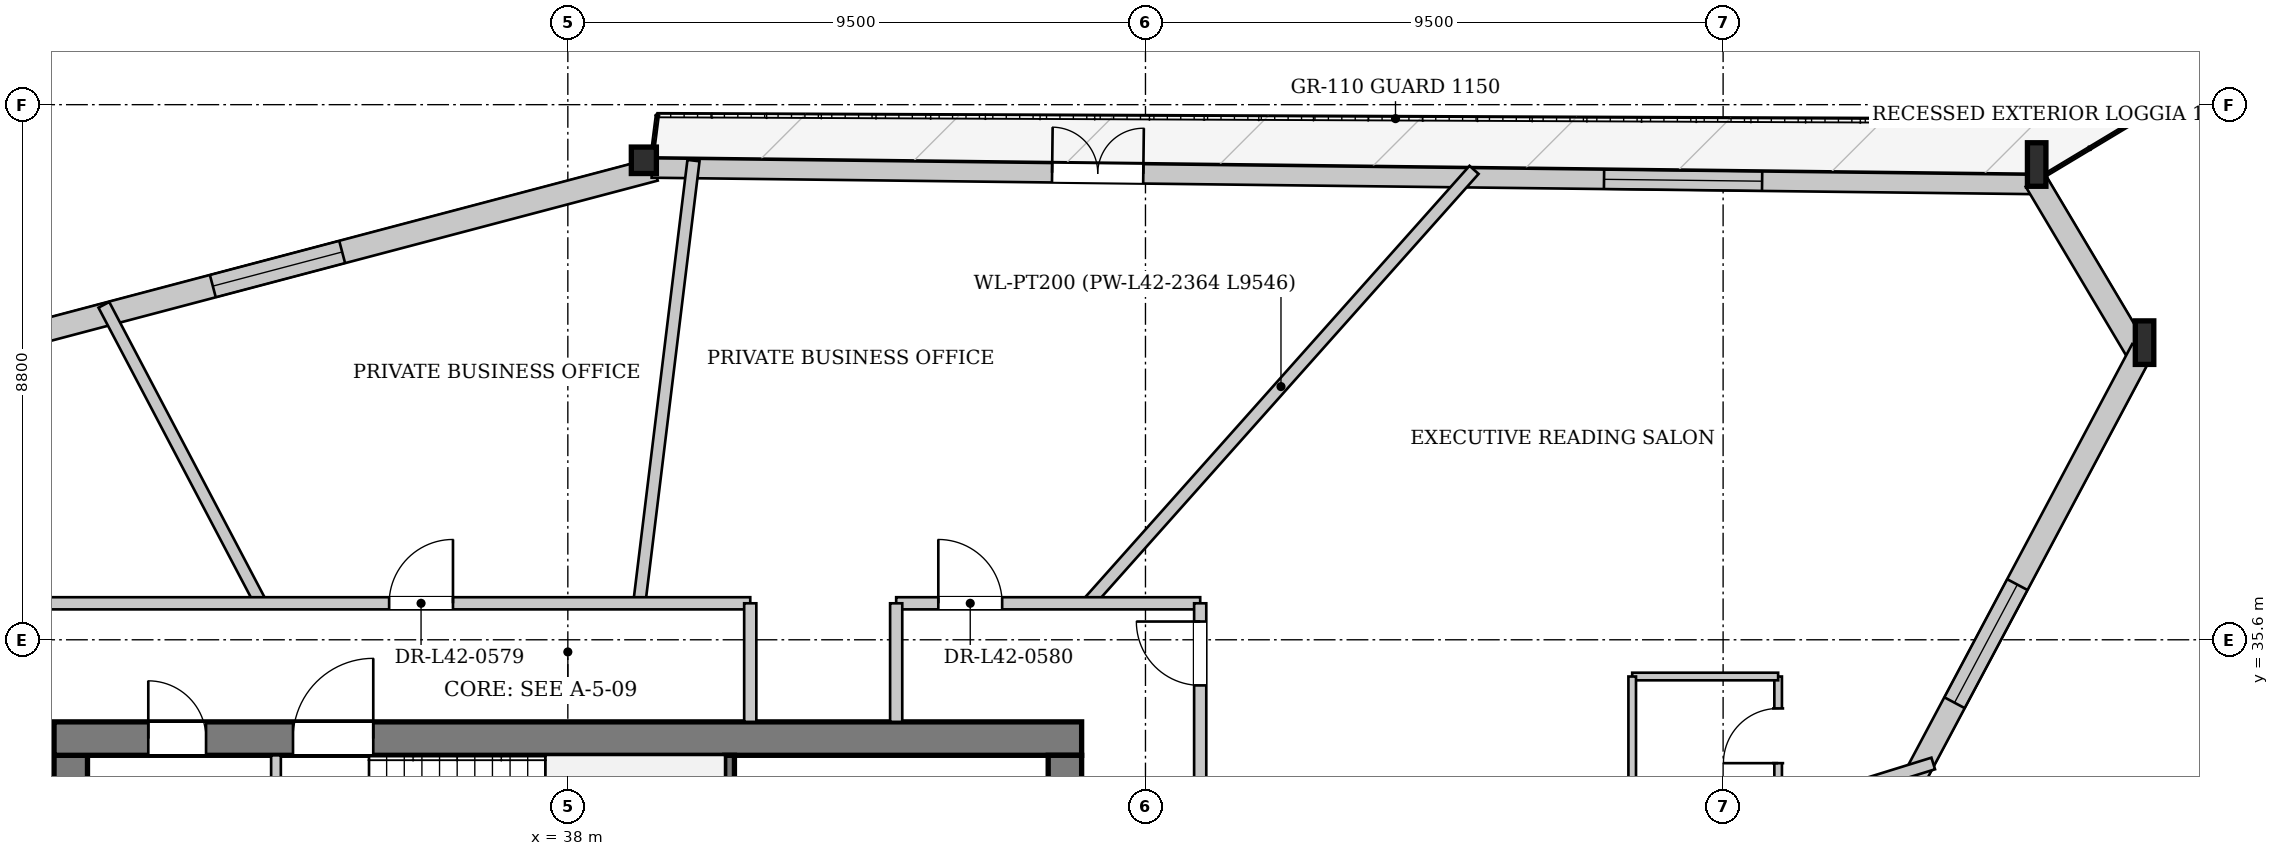
"""IFC4 building model, lengths in metres.
Left out: names, types, materials, properties, quantities, classifications, styles, units other than length and angle.
Written with IfcOpenShell. Run it as: python <this file> out.ifc"""

import sys

from ifc_helpers import new_model, si_unit, direction, frame, frame_2d, origin, origin_2d, place, context, subcontext, project, spatial, rectangle, i_section, extrude, source, transform, mapped, element, fill, save


model = new_model("IFC4")
c1 = context("Model", 3, precision=1e-05, world=origin(), true_north=direction((0.0, 1.0)))
c2 = subcontext(c1, "Body", "Model", "MODEL_VIEW")
j1 = project(units=[si_unit("LENGTHUNIT", "METRE"), si_unit("PLANEANGLEUNIT", "RADIAN")], contexts=[c1])
p1 = place(None, origin())
s1 = spatial("IfcSite", under=j1, at=p1, CompositionType="ELEMENT")
p2 = place(p1, origin())
s2 = spatial("IfcBuilding", under=s1, at=p2, CompositionType="ELEMENT")
p3 = place(p2, frame((0.0, 0.0, 160.8)))
s3 = spatial("IfcBuildingStorey", under=s2, at=p3, CompositionType="ELEMENT", Elevation=160.8)
m1 = source(origin(), c2, "Body", "SweptSolid", [
    extrude(i_section(OverallWidth=0.304, OverallDepth=0.716, WebThickness=0.021, FlangeThickness=0.04, at=origin_2d()), origin(), (0.0, 0.0, 1.0), 3.419),
])
p4 = place(p3, frame((64.064, 40.286, 0.0), z_axis=(-0.077692176517, 0.11710953078, 0.990075392841), x_axis=(-0.833298909309, -0.552822691054, 0.0)))
e1 = element("IfcColumn", 1, at=p4, inside=s3, PredefinedType="COLUMN", context=c2, shape_type="MappedRepresentation", body=[
    mapped(m1, transform((0.0, 0.0, 0.0), x_axis=(1.0, 0.0, 0.0), y_axis=(0.0, 1.0, 0.0), z_axis=(0.0, 0.0, 1.0), scale=1.0)),
])
m2 = source(origin(), c2, "Body", "SweptSolid", [
    extrude(i_section(OverallWidth=0.304, OverallDepth=0.716, WebThickness=0.021, FlangeThickness=0.04, at=origin_2d()), origin(), (0.0, 0.0, 1.0), 3.415),
])
p5 = place(p3, frame((62.303, 43.246, 0.0), z_axis=(-0.085515107199, 0.099457787721, 0.99136033555), x_axis=(-0.758255258479, -0.651957792337, 0.0)))
e2 = element("IfcColumn", 2, at=p5, inside=s3, PredefinedType="COLUMN", context=c2, shape_type="MappedRepresentation", body=[
    mapped(m2, transform((0.0, 0.0, 0.0), x_axis=(1.0, 0.0, 0.0), y_axis=(0.0, 1.0, 0.0), z_axis=(0.0, 0.0, 1.0), scale=1.0)),
])
m3 = source(origin(), c2, "Body", "SweptSolid", [
    extrude(i_section(OverallWidth=0.412, OverallDepth=0.435, WebThickness=0.031, FlangeThickness=0.05, at=origin_2d()), origin(), (0.0, 0.0, 1.0), 3.396),
])
p6 = place(p3, frame((39.382, 43.519, 0.0), z_axis=(-0.077429287371, -0.019698815914, 0.996803221358), x_axis=(0.246556357223, -0.969128455218, 0.0)))
e3 = element("IfcColumn", 3, at=p6, inside=s3, PredefinedType="COLUMN", context=c2, shape_type="MappedRepresentation", body=[
    mapped(m3, transform((0.0, 0.0, 0.0), x_axis=(1.0, 0.0, 0.0), y_axis=(0.0, 1.0, 0.0), z_axis=(0.0, 0.0, 1.0), scale=1.0)),
])
p7 = place(p3, frame((17.267, 37.484, 0.0), z_axis=(0.0, 0.0, 1.0), x_axis=(0.966875026681, 0.255250235613, 0.0)))
e4 = element("IfcWall", 4, at=p7, inside=s3, PredefinedType="SOLIDWALL", context=c2, shape_type="SweptSolid", body=[
    extrude(rectangle(XDim=22.923, YDim=0.38, at=frame_2d((11.461, 0.0))), origin(), (0.0, 0.0, 1.0), 2.722),
])
p8 = place(p7, frame((5.318, 0.0, 0.352)))
e5 = element("IfcOpeningElement", 5, at=p8, cuts=e4, PredefinedType="OPENING", context=c2, shape_type="SweptSolid", body=[
    extrude(rectangle(XDim=2.2, YDim=2.25, at=frame_2d((1.1, 1.125))), frame((0.0, 0.2, 0.0), z_axis=(0.0, -1.0, 0.0), x_axis=(1.0, 0.0, 0.0)), (0.0, 0.0, 1.0), 0.4),
])
p9 = place(p7, frame((15.405, 0.0, 0.352)))
e6 = element("IfcOpeningElement", 6, at=p9, cuts=e4, PredefinedType="OPENING", context=c2, shape_type="SweptSolid", body=[
    extrude(rectangle(XDim=2.2, YDim=2.25, at=frame_2d((1.1, 1.125))), frame((0.0, 0.2, 0.0), z_axis=(0.0, -1.0, 0.0), x_axis=(1.0, 0.0, 0.0)), (0.0, 0.0, 1.0), 0.4),
])
p10 = place(p3, frame((39.38, 43.359, 0.0), z_axis=(0.0, 0.0, 1.0), x_axis=(0.999929231853, -0.011896692251, 0.0)))
e7 = element("IfcWall", 7, at=p10, inside=s3, PredefinedType="SOLIDWALL", context=c2, shape_type="SweptSolid", body=[
    extrude(rectangle(XDim=22.923, YDim=0.32, at=frame_2d((11.461, 0.0))), origin(), (0.0, 0.0, 1.0), 2.722),
])
p11 = place(p10, frame((6.585, 0.0, 0.0)))
e8 = element("IfcOpeningElement", 8, at=p11, cuts=e7, PredefinedType="OPENING", context=c2, shape_type="SweptSolid", body=[
    extrude(rectangle(XDim=1.5, YDim=2.3, at=frame_2d((0.75, 1.15))), frame((0.0, 0.17, 0.0), z_axis=(0.0, -1.0, 0.0), x_axis=(1.0, 0.0, 0.0)), (0.0, 0.0, 1.0), 0.34),
])
p12 = place(p10, frame((15.663, 0.0, 0.252)))
e9 = element("IfcOpeningElement", 9, at=p12, cuts=e7, PredefinedType="OPENING", context=c2, shape_type="SweptSolid", body=[
    extrude(rectangle(XDim=2.6, YDim=2.35, at=frame_2d((1.3, 1.175))), frame((0.0, 0.17, 0.0), z_axis=(0.0, -1.0, 0.0), x_axis=(1.0, 0.0, 0.0)), (0.0, 0.0, 1.0), 0.34),
])
p13 = place(p3, frame((62.14, 43.149, 0.0), z_axis=(0.0, 0.0, 1.0), x_axis=(0.511323081813, -0.859388565205, 0.0)))
e10 = element("IfcWall", 10, at=p13, inside=s3, PredefinedType="SOLIDWALL", context=c2, shape_type="SweptSolid", body=[
    extrude(rectangle(XDim=3.444, YDim=0.38, at=frame_2d((1.722, 0.0))), origin(), (0.0, 0.0, 1.0), 2.722),
])
p14 = place(p3, frame((63.896, 40.375, 0.0), z_axis=(0.0, 0.0, 1.0), x_axis=(-0.469579724412, -0.882890073804, 0.0)))
e11 = element("IfcWall", 11, at=p14, inside=s3, PredefinedType="SOLIDWALL", context=c2, shape_type="SweptSolid", body=[
    extrude(rectangle(XDim=23.503, YDim=0.38, at=frame_2d((11.751, 0.0))), origin(), (0.0, 0.0, 1.0), 2.722),
])
p15 = place(p14, frame((4.381, 0.0, 0.352)))
e12 = element("IfcOpeningElement", 12, at=p15, cuts=e11, PredefinedType="OPENING", context=c2, shape_type="SweptSolid", body=[
    extrude(rectangle(XDim=2.2, YDim=2.25, at=frame_2d((1.1, 1.125))), frame((0.0, 0.2, 0.0), z_axis=(0.0, -1.0, 0.0), x_axis=(1.0, 0.0, 0.0)), (0.0, 0.0, 1.0), 0.4),
])
p16 = place(p14, frame((15.822, 0.0, 0.352)))
e13 = element("IfcOpeningElement", 13, at=p16, cuts=e11, PredefinedType="OPENING", context=c2, shape_type="SweptSolid", body=[
    extrude(rectangle(XDim=2.2, YDim=2.25, at=frame_2d((1.1, 1.125))), frame((0.0, 0.2, 0.0), z_axis=(0.0, -1.0, 0.0), x_axis=(1.0, 0.0, 0.0)), (0.0, 0.0, 1.0), 0.4),
])
p17 = place(p3, frame((29.825, 19.5, 0.0), z_axis=(0.0, 0.0, 1.0), x_axis=(0.0, 1.0, 0.0)))
e14 = element("IfcWall", 14, at=p17, inside=s3, PredefinedType="SHEAR", context=c2, shape_type="SweptSolid", body=[
    extrude(rectangle(XDim=14.2, YDim=0.55, at=frame_2d((7.1, 0.0))), origin(), (0.0, 0.0, 1.0), 3.33),
])
p18 = place(p17, frame((7.42, 0.0, 0.0)))
e15 = element("IfcOpeningElement", 15, at=p18, cuts=e14, PredefinedType="OPENING", context=c2, shape_type="SweptSolid", body=[
    extrude(rectangle(XDim=1.6, YDim=2.2, at=frame_2d((0.8, 1.1))), frame((0.0, 0.285, 0.0), z_axis=(0.0, -1.0, 0.0), x_axis=(1.0, 0.0, 0.0)), (0.0, 0.0, 1.0), 0.57),
])
p19 = place(p3, frame((29.55, 33.975, 0.0), z_axis=(0.0, 0.0, 1.0), x_axis=(1.0, 0.0, 0.0)))
e16 = element("IfcWall", 16, at=p19, inside=s3, PredefinedType="SHEAR", context=c2, shape_type="SweptSolid", body=[
    extrude(rectangle(XDim=16.9, YDim=0.55, at=frame_2d((8.45, 0.0))), origin(), (0.0, 0.0, 1.0), 3.33),
])
p20 = place(p19, frame((1.55, 0.0, 0.0)))
e17 = element("IfcOpeningElement", 17, at=p20, cuts=e16, PredefinedType="OPENING", context=c2, shape_type="SweptSolid", body=[
    extrude(rectangle(XDim=0.95, YDim=2.1, at=frame_2d((0.475, 1.05))), frame((0.0, 0.285, 0.0), z_axis=(0.0, -1.0, 0.0), x_axis=(1.0, 0.0, 0.0)), (0.0, 0.0, 1.0), 0.57),
])
p21 = place(p19, frame((3.93, 0.0, 0.0)))
e18 = element("IfcOpeningElement", 18, at=p21, cuts=e16, PredefinedType="OPENING", context=c2, shape_type="SweptSolid", body=[
    extrude(rectangle(XDim=1.32, YDim=2.2, at=frame_2d((0.66, 1.1))), frame((0.0, 0.285, 0.0), z_axis=(0.0, -1.0, 0.0), x_axis=(1.0, 0.0, 0.0)), (0.0, 0.0, 1.0), 0.57),
])
p22 = place(p3, frame((46.175, 33.7, 0.0), z_axis=(0.0, 0.0, 1.0), x_axis=(0.0, -1.0, 0.0)))
e19 = element("IfcWall", 19, at=p22, inside=s3, PredefinedType="SHEAR", context=c2, shape_type="SweptSolid", body=[
    extrude(rectangle(XDim=14.2, YDim=0.55, at=frame_2d((7.1, 0.0))), origin(), (0.0, 0.0, 1.0), 3.33),
])
p23 = place(p22, frame((5.18, 0.0, 0.0)))
e20 = element("IfcOpeningElement", 20, at=p23, cuts=e19, PredefinedType="OPENING", context=c2, shape_type="SweptSolid", body=[
    extrude(rectangle(XDim=1.6, YDim=2.2, at=frame_2d((0.8, 1.1))), frame((0.0, 0.285, 0.0), z_axis=(0.0, -1.0, 0.0), x_axis=(1.0, 0.0, 0.0)), (0.0, 0.0, 1.0), 0.57),
])
p24 = place(p22, frame((2.05, 0.0, 0.0)))
e21 = element("IfcOpeningElement", 21, at=p24, cuts=e19, PredefinedType="OPENING", context=c2, shape_type="SweptSolid", body=[
    extrude(rectangle(XDim=0.95, YDim=2.1, at=frame_2d((0.475, 1.05))), frame((0.0, 0.285, 0.0), z_axis=(0.0, -1.0, 0.0), x_axis=(1.0, 0.0, 0.0)), (0.0, 0.0, 1.0), 0.57),
])
p25 = place(p3, frame((40.66, 30.6, 0.0), z_axis=(0.0, 0.0, 1.0), x_axis=(0.0, 1.0, 0.0)))
e22 = element("IfcWall", 22, at=p25, inside=s3, PredefinedType="PARTITIONING", context=c2, shape_type="SweptSolid", body=[
    extrude(rectangle(XDim=3.1, YDim=0.16, at=frame_2d((1.55, 0.0))), origin(), (0.0, 0.0, 1.0), 3.33),
])
p26 = place(p3, frame((33.2, 28.44, 0.0), z_axis=(0.0, 0.0, 1.0), x_axis=(0.0, 1.0, 0.0)))
e23 = element("IfcWall", 23, at=p26, inside=s3, PredefinedType="PARTITIONING", context=c2, shape_type="SweptSolid", body=[
    extrude(rectangle(XDim=5.26, YDim=0.16, at=frame_2d((2.63, 0.0))), origin(), (0.0, 0.0, 1.0), 3.33),
])
p27 = place(p3, frame((46.553, 36.2, 0.0), z_axis=(0.0, 0.0, 1.0), x_axis=(0.665220558554, 0.746646910177, 0.0)))
e24 = element("IfcWall", 24, at=p27, inside=s3, PredefinedType="PARTITIONING", context=c2, shape_type="SweptSolid", body=[
    extrude(rectangle(XDim=9.547, YDim=0.2, at=frame_2d((4.773, 0.0))), origin(), (0.0, 0.0, 1.0), 3.33),
])
p28 = place(p3, frame((39.175, 36.2, 0.0), z_axis=(0.0, 0.0, 1.0), x_axis=(0.121486313452, 0.992593106788, 0.0)))
e25 = element("IfcWall", 25, at=p28, inside=s3, PredefinedType="PARTITIONING", context=c2, shape_type="SweptSolid", body=[
    extrude(rectangle(XDim=7.335, YDim=0.2, at=frame_2d((3.667, 0.0))), origin(), (0.0, 0.0, 1.0), 3.33),
])
p29 = place(p3, frame((32.951, 36.2, 0.0), z_axis=(0.0, 0.0, 1.0), x_axis=(-0.465485147259, 0.885055691853, 0.0)))
e26 = element("IfcWall", 26, at=p29, inside=s3, PredefinedType="PARTITIONING", context=c2, shape_type="SweptSolid", body=[
    extrude(rectangle(XDim=5.546, YDim=0.2, at=frame_2d((2.773, 0.0))), origin(), (0.0, 0.0, 1.0), 3.33),
])
p30 = place(p3, frame((48.4, 29.826, 0.0), z_axis=(0.0, 0.0, 1.0), x_axis=(0.955101512308, 0.296278755883, 0.0)))
e27 = element("IfcWall", 27, at=p30, inside=s3, PredefinedType="PARTITIONING", context=c2, shape_type="SweptSolid", body=[
    extrude(rectangle(XDim=12.622, YDim=0.2, at=frame_2d((6.311, 0.0))), origin(), (0.0, 0.0, 1.0), 3.33),
])
p31 = place(p3, frame((57.905, 33.046, 0.0), z_axis=(0.0, 0.0, 1.0), x_axis=(0.0, 1.0, 0.0)))
e28 = element("IfcWall", 28, at=p31, inside=s3, PredefinedType="PARTITIONING", context=c2, shape_type="SweptSolid", body=[
    extrude(rectangle(XDim=1.95, YDim=0.125, at=frame_2d((0.975, 0.0))), origin(), (0.0, 0.0, 1.0), 3.33),
])
p32 = place(p31, frame((0.525, 0.0, 0.0)))
e29 = element("IfcOpeningElement", 29, at=p32, cuts=e28, PredefinedType="OPENING", context=c2, shape_type="SweptSolid", body=[
    extrude(rectangle(XDim=0.9, YDim=2.1, at=frame_2d((0.45, 1.05))), frame((0.0, 0.073, 0.0), z_axis=(0.0, -1.0, 0.0), x_axis=(1.0, 0.0, 0.0)), (0.0, 0.0, 1.0), 0.145),
])
p33 = place(p3, frame((57.905, 34.996, 0.0), z_axis=(0.0, 0.0, 1.0), x_axis=(-1.0, 0.0, 0.0)))
e30 = element("IfcWall", 30, at=p33, inside=s3, PredefinedType="PARTITIONING", context=c2, shape_type="SweptSolid", body=[
    extrude(rectangle(XDim=2.4, YDim=0.125, at=frame_2d((1.2, 0.0))), origin(), (0.0, 0.0, 1.0), 3.33),
])
p34 = place(p3, frame((55.505, 34.996, 0.0), z_axis=(0.0, 0.0, 1.0), x_axis=(0.0, -1.0, 0.0)))
e31 = element("IfcWall", 31, at=p34, inside=s3, PredefinedType="PARTITIONING", context=c2, shape_type="SweptSolid", body=[
    extrude(rectangle(XDim=1.95, YDim=0.125, at=frame_2d((0.975, 0.0))), origin(), (0.0, 0.0, 1.0), 3.33),
])
p35 = place(p3, frame((27.6, 36.2, 0.0), z_axis=(0.0, 0.0, 1.0), x_axis=(1.0, 0.0, 0.0)))
e32 = element("IfcWall", 32, at=p35, inside=s3, PredefinedType="PARTITIONING", context=c2, shape_type="SweptSolid", body=[
    extrude(rectangle(XDim=13.4, YDim=0.2, at=frame_2d((6.7, 0.0))), origin(), (0.0, 0.0, 1.0), 3.33),
])
p36 = place(p35, frame((7.461, 0.0, 0.0)))
e33 = element("IfcOpeningElement", 33, at=p36, cuts=e32, PredefinedType="OPENING", context=c2, shape_type="SweptSolid", body=[
    extrude(rectangle(XDim=1.05, YDim=2.2, at=frame_2d((0.525, 1.1))), frame((0.0, 0.11, 0.0), z_axis=(0.0, -1.0, 0.0), x_axis=(1.0, 0.0, 0.0)), (0.0, 0.0, 1.0), 0.22),
])
p37 = place(p3, frame((41.0, 34.25, 0.0), z_axis=(0.0, 0.0, 1.0), x_axis=(0.0, 1.0, 0.0)))
e34 = element("IfcWall", 34, at=p37, inside=s3, PredefinedType="PARTITIONING", context=c2, shape_type="SweptSolid", body=[
    extrude(rectangle(XDim=1.95, YDim=0.2, at=frame_2d((0.975, 0.0))), origin(), (0.0, 0.0, 1.0), 3.33),
])
p38 = place(p3, frame((43.4, 36.2, 0.0), z_axis=(0.0, 0.0, 1.0), x_axis=(1.0, 0.0, 0.0)))
e35 = element("IfcWall", 35, at=p38, inside=s3, PredefinedType="PARTITIONING", context=c2, shape_type="SweptSolid", body=[
    extrude(rectangle(XDim=5.0, YDim=0.2, at=frame_2d((2.5, 0.0))), origin(), (0.0, 0.0, 1.0), 3.33),
])
p39 = place(p38, frame((0.693, 0.0, 0.0)))
e36 = element("IfcOpeningElement", 36, at=p39, cuts=e35, PredefinedType="OPENING", context=c2, shape_type="SweptSolid", body=[
    extrude(rectangle(XDim=1.05, YDim=2.2, at=frame_2d((0.525, 1.1))), frame((0.0, 0.11, 0.0), z_axis=(0.0, -1.0, 0.0), x_axis=(1.0, 0.0, 0.0)), (0.0, 0.0, 1.0), 0.22),
])
p40 = place(p3, frame((43.4, 34.25, 0.0), z_axis=(0.0, 0.0, 1.0), x_axis=(0.0, 1.0, 0.0)))
e37 = element("IfcWall", 37, at=p40, inside=s3, PredefinedType="PARTITIONING", context=c2, shape_type="SweptSolid", body=[
    extrude(rectangle(XDim=1.95, YDim=0.2, at=frame_2d((0.975, 0.0))), origin(), (0.0, 0.0, 1.0), 3.33),
])
p41 = place(p3, frame((48.4, 17.0, 0.0), z_axis=(0.0, 0.0, 1.0), x_axis=(0.0, 1.0, 0.0)))
e38 = element("IfcWall", 38, at=p41, inside=s3, PredefinedType="PARTITIONING", context=c2, shape_type="SweptSolid", body=[
    extrude(rectangle(XDim=19.2, YDim=0.2, at=frame_2d((9.6, 0.0))), origin(), (0.0, 0.0, 1.0), 3.33),
])
p42 = place(p41, frame((7.875, 0.0, 0.0)))
e39 = element("IfcOpeningElement", 39, at=p42, cuts=e38, PredefinedType="OPENING", context=c2, shape_type="SweptSolid", body=[
    extrude(rectangle(XDim=1.05, YDim=2.2, at=frame_2d((0.525, 1.1))), frame((0.0, 0.11, 0.0), z_axis=(0.0, -1.0, 0.0), x_axis=(1.0, 0.0, 0.0)), (0.0, 0.0, 1.0), 0.22),
])
p43 = place(p41, frame((17.85, 0.0, 0.0)))
e40 = element("IfcOpeningElement", 40, at=p43, cuts=e38, PredefinedType="OPENING", context=c2, shape_type="SweptSolid", body=[
    extrude(rectangle(XDim=1.05, YDim=2.2, at=frame_2d((0.525, 1.1))), frame((0.0, 0.11, 0.0), z_axis=(0.0, -1.0, 0.0), x_axis=(1.0, 0.0, 0.0)), (0.0, 0.0, 1.0), 0.22),
])
m4 = source(origin(), c2, "Body", "SweptSolid", [
    extrude(rectangle(XDim=2.2, YDim=2.25, at=frame_2d((1.1, 1.125))), frame((0.0, 0.03, 0.0), z_axis=(0.0, -1.0, 0.0), x_axis=(1.0, 0.0, 0.0)), (0.0, 0.0, 1.0), 0.06),
])
p44 = place(p9, origin())
e41 = element("IfcWindow", 41, at=p44, inside=s3, PartitioningType="SINGLE_PANEL", PredefinedType="WINDOW", context=c2, shape_type="MappedRepresentation", body=[
    mapped(m4, transform((0.0, 0.0, 0.0), x_axis=(1.0, 0.0, 0.0), y_axis=(0.0, 1.0, 0.0), z_axis=(0.0, 0.0, 1.0), scale=1.0)),
])
fill(e6, e41)
m5 = source(origin(), c2, "Body", "SweptSolid", [
    extrude(rectangle(XDim=1.5, YDim=2.3, at=frame_2d((0.75, 1.15))), frame((0.0, 0.025, 0.0), z_axis=(0.0, -1.0, 0.0), x_axis=(1.0, 0.0, 0.0)), (0.0, 0.0, 1.0), 0.05),
])
p45 = place(p11, origin())
e42 = element("IfcDoor", 42, at=p45, inside=s3, OperationType="DOUBLE_DOOR_SINGLE_SWING", PredefinedType="DOOR", context=c2, shape_type="MappedRepresentation", body=[
    mapped(m5, transform((0.0, 0.0, 0.0), x_axis=(1.0, 0.0, 0.0), y_axis=(0.0, 1.0, 0.0), z_axis=(0.0, 0.0, 1.0), scale=1.0)),
])
fill(e8, e42)
m6 = source(origin(), c2, "Body", "SweptSolid", [
    extrude(rectangle(XDim=2.6, YDim=2.35, at=frame_2d((1.3, 1.175))), frame((0.0, 0.03, 0.0), z_axis=(0.0, -1.0, 0.0), x_axis=(1.0, 0.0, 0.0)), (0.0, 0.0, 1.0), 0.06),
])
p46 = place(p12, origin())
e43 = element("IfcWindow", 43, at=p46, inside=s3, PartitioningType="SINGLE_PANEL", PredefinedType="WINDOW", context=c2, shape_type="MappedRepresentation", body=[
    mapped(m6, transform((0.0, 0.0, 0.0), x_axis=(1.0, 0.0, 0.0), y_axis=(0.0, 1.0, 0.0), z_axis=(0.0, 0.0, 1.0), scale=1.0)),
])
fill(e9, e43)
p47 = place(p15, origin())
e44 = element("IfcWindow", 44, at=p47, inside=s3, PartitioningType="SINGLE_PANEL", PredefinedType="WINDOW", context=c2, shape_type="MappedRepresentation", body=[
    mapped(m4, transform((0.0, 0.0, 0.0), x_axis=(1.0, 0.0, 0.0), y_axis=(0.0, 1.0, 0.0), z_axis=(0.0, 0.0, 1.0), scale=1.0)),
])
fill(e12, e44)
m7 = source(origin(), c2, "Body", "SweptSolid", [
    extrude(rectangle(XDim=0.95, YDim=2.1, at=frame_2d((0.475, 1.05))), frame((0.0, 0.025, 0.0), z_axis=(0.0, -1.0, 0.0), x_axis=(1.0, 0.0, 0.0)), (0.0, 0.0, 1.0), 0.05),
])
p48 = place(p20, origin())
e45 = element("IfcDoor", 45, at=p48, inside=s3, OperationType="SINGLE_SWING_LEFT", PredefinedType="DOOR", context=c2, shape_type="MappedRepresentation", body=[
    mapped(m7, transform((0.0, 0.0, 0.0), x_axis=(1.0, 0.0, 0.0), y_axis=(0.0, 1.0, 0.0), z_axis=(0.0, 0.0, 1.0), scale=1.0)),
])
fill(e17, e45)
m8 = source(origin(), c2, "Body", "SweptSolid", [
    extrude(rectangle(XDim=1.32, YDim=2.2, at=frame_2d((0.66, 1.1))), frame((0.0, 0.025, 0.0), z_axis=(0.0, -1.0, 0.0), x_axis=(1.0, 0.0, 0.0)), (0.0, 0.0, 1.0), 0.05),
])
p49 = place(p21, origin())
e46 = element("IfcDoor", 46, at=p49, inside=s3, OperationType="SINGLE_SWING_RIGHT", PredefinedType="DOOR", context=c2, shape_type="MappedRepresentation", body=[
    mapped(m8, transform((0.0, 0.0, 0.0), x_axis=(1.0, 0.0, 0.0), y_axis=(0.0, 1.0, 0.0), z_axis=(0.0, 0.0, 1.0), scale=1.0)),
])
fill(e18, e46)
m9 = source(origin(), c2, "Body", "SweptSolid", [
    extrude(rectangle(XDim=0.9, YDim=2.1, at=frame_2d((0.45, 1.05))), frame((0.0, 0.025, 0.0), z_axis=(0.0, -1.0, 0.0), x_axis=(1.0, 0.0, 0.0)), (0.0, 0.0, 1.0), 0.05),
])
p50 = place(p32, origin())
e47 = element("IfcDoor", 47, at=p50, inside=s3, OperationType="SINGLE_SWING_LEFT", PredefinedType="DOOR", context=c2, shape_type="MappedRepresentation", body=[
    mapped(m9, transform((0.0, 0.0, 0.0), x_axis=(1.0, 0.0, 0.0), y_axis=(0.0, 1.0, 0.0), z_axis=(0.0, 0.0, 1.0), scale=1.0)),
])
fill(e29, e47)
m10 = source(origin(), c2, "Body", "SweptSolid", [
    extrude(rectangle(XDim=1.05, YDim=2.2, at=frame_2d((0.525, 1.1))), frame((0.0, 0.025, 0.0), z_axis=(0.0, -1.0, 0.0), x_axis=(1.0, 0.0, 0.0)), (0.0, 0.0, 1.0), 0.05),
])
p51 = place(p36, origin())
e48 = element("IfcDoor", 48, at=p51, inside=s3, OperationType="SINGLE_SWING_RIGHT", PredefinedType="DOOR", context=c2, shape_type="MappedRepresentation", body=[
    mapped(m10, transform((0.0, 0.0, 0.0), x_axis=(1.0, 0.0, 0.0), y_axis=(0.0, 1.0, 0.0), z_axis=(0.0, 0.0, 1.0), scale=1.0)),
])
fill(e33, e48)
p52 = place(p39, origin())
e49 = element("IfcDoor", 49, at=p52, inside=s3, OperationType="SINGLE_SWING_LEFT", PredefinedType="DOOR", context=c2, shape_type="MappedRepresentation", body=[
    mapped(m10, transform((0.0, 0.0, 0.0), x_axis=(1.0, 0.0, 0.0), y_axis=(0.0, 1.0, 0.0), z_axis=(0.0, 0.0, 1.0), scale=1.0)),
])
fill(e36, e49)
p53 = place(p43, origin())
e50 = element("IfcDoor", 50, at=p53, inside=s3, OperationType="SINGLE_SWING_RIGHT", PredefinedType="DOOR", context=c2, shape_type="MappedRepresentation", body=[
    mapped(m10, transform((0.0, 0.0, 0.0), x_axis=(1.0, 0.0, 0.0), y_axis=(0.0, 1.0, 0.0), z_axis=(0.0, 0.0, 1.0), scale=1.0)),
])
fill(e40, e50)
save(model, sys.argv[1])
